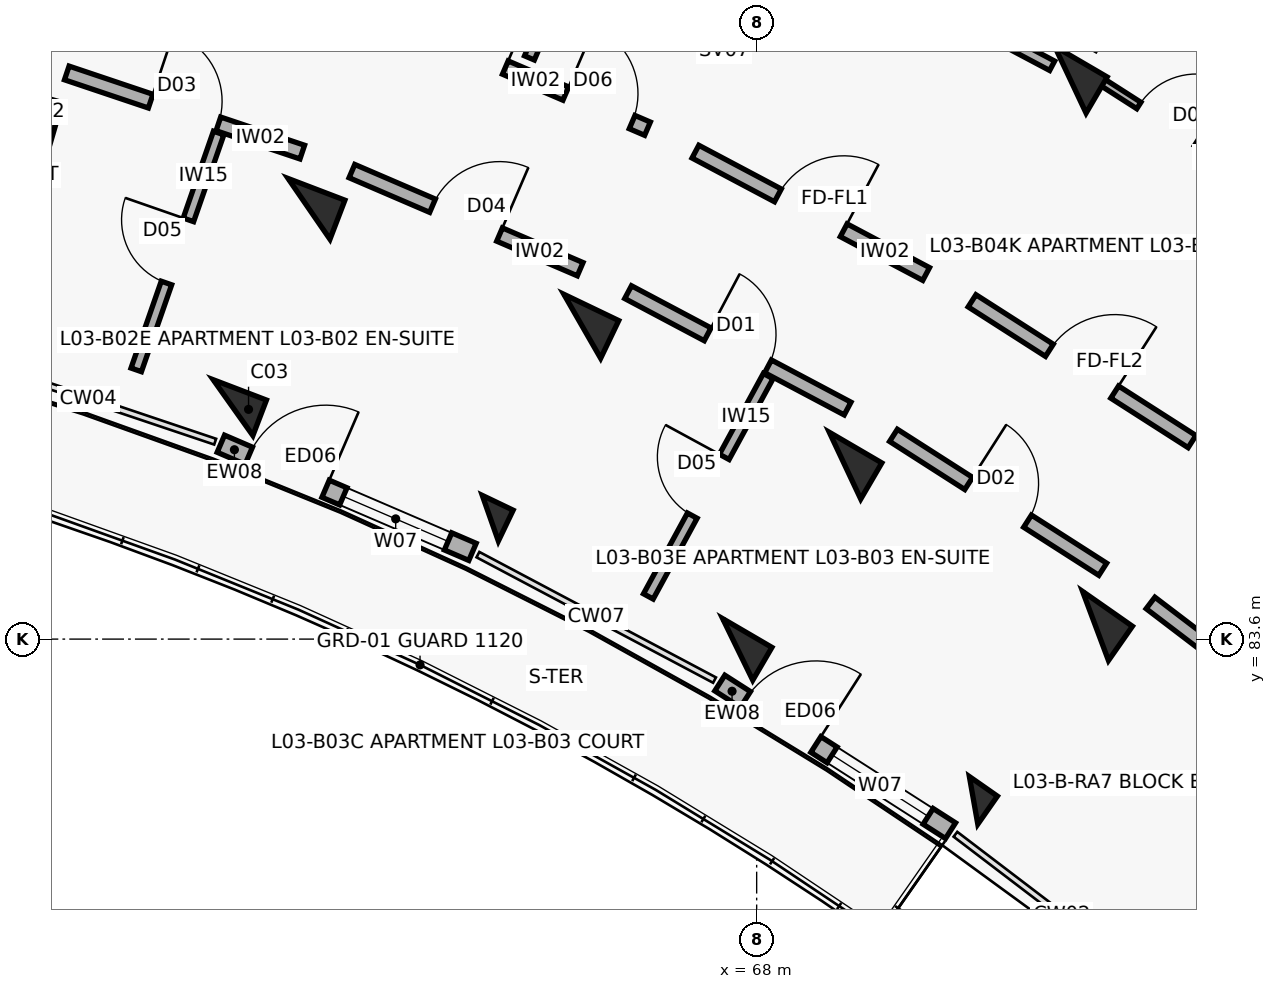
"""IFC4 building model, lengths in metres.
Left out: names, types, materials, properties, quantities, classifications, styles, units other than length and angle.
Written with IfcOpenShell. Run it as: python <this file> out.ifc"""

import sys

from ifc_helpers import new_model, si_unit, direction, frame, frame_2d, origin, origin_2d, place, context, subcontext, project, spatial, rectangle, extrude, element, fill, save


model = new_model("IFC4")
c1 = context("Model", 3, precision=1e-05, world=origin(), true_north=direction((0.0, 1.0)))
c2 = subcontext(c1, "Body", "Model", "MODEL_VIEW")
j1 = project(units=[si_unit("LENGTHUNIT", "METRE"), si_unit("PLANEANGLEUNIT", "RADIAN")], contexts=[c1])
p1 = place(None, origin())
s1 = spatial("IfcSite", under=j1, at=p1, CompositionType="ELEMENT")
p2 = place(p1, origin())
s2 = spatial("IfcBuilding", under=s1, at=p2, CompositionType="ELEMENT")
p3 = place(p2, frame((0.0, 0.0, 11.2)))
s3 = spatial("IfcBuildingStorey", under=s2, at=p3, CompositionType="ELEMENT", Elevation=11.2)
p4 = place(p3, frame((58.401, 90.508, 0.0), z_axis=(0.0, 0.0, 1.0), x_axis=(0.27966144946, 0.96009867914, 0.0)))
e1 = element("IfcColumn", 1, at=p4, inside=s3, PredefinedType="COLUMN", context=c2, shape_type="SweptSolid", body=[
    extrude(rectangle(XDim=0.55, YDim=0.8, at=origin_2d()), origin(), (0.0, 0.0, 1.0), 3.1),
])
p5 = place(p3, frame((61.111, 86.646, 0.0), z_axis=(0.0, 0.0, 1.0), x_axis=(0.357064076459, 0.934079892355, 0.0)))
e2 = element("IfcColumn", 2, at=p5, inside=s3, PredefinedType="COLUMN", context=c2, shape_type="SweptSolid", body=[
    extrude(rectangle(XDim=0.5, YDim=0.75, at=origin_2d()), origin(), (0.0, 0.0, 1.0), 3.1),
])
p6 = place(p3, frame((62.111, 89.261, 0.0), z_axis=(0.0, 0.0, 1.0), x_axis=(0.357064076459, 0.934079892355, 0.0)))
e3 = element("IfcColumn", 3, at=p6, inside=s3, PredefinedType="COLUMN", context=c2, shape_type="SweptSolid", body=[
    extrude(rectangle(XDim=0.55, YDim=0.8, at=origin_2d()), origin(), (0.0, 0.0, 1.0), 3.1),
])
p7 = place(p3, frame((64.496, 85.191, 0.0), z_axis=(0.0, 0.0, 1.0), x_axis=(0.432085748802, 0.901832526405, 0.0)))
e4 = element("IfcColumn", 4, at=p7, inside=s3, PredefinedType="COLUMN", context=c2, shape_type="SweptSolid", body=[
    extrude(rectangle(XDim=0.45, YDim=0.45, at=origin_2d()), origin(), (0.0, 0.0, 1.0), 3.1),
])
p8 = place(p3, frame((65.706, 87.716, 0.0), z_axis=(0.0, 0.0, 1.0), x_axis=(0.432085748802, 0.901832526405, 0.0)))
e5 = element("IfcColumn", 5, at=p8, inside=s3, PredefinedType="COLUMN", context=c2, shape_type="SweptSolid", body=[
    extrude(rectangle(XDim=0.55, YDim=0.8, at=origin_2d()), origin(), (0.0, 0.0, 1.0), 3.1),
])
p9 = place(p3, frame((67.751, 83.464, 0.0), z_axis=(0.0, 0.0, 1.0), x_axis=(0.504226211181, 0.863571611366, 0.0)))
e6 = element("IfcColumn", 6, at=p9, inside=s3, PredefinedType="COLUMN", context=c2, shape_type="SweptSolid", body=[
    extrude(rectangle(XDim=0.5, YDim=0.75, at=origin_2d()), origin(), (0.0, 0.0, 1.0), 3.1),
])
for number, where, z_axis, x_axis in (
    (7, (69.163, 85.882, 0.0), (0.0, 0.0, 1.0), (0.504, 0.864, 0.0)),
    (8, (72.127, 90.96, 0.0), (0.0, 0.0, 1.0), (0.504, 0.864, 0.0)),
):
    element("IfcColumn", number, at=place(p3, frame(where, z_axis=z_axis, x_axis=x_axis)), inside=s3, PredefinedType="COLUMN", context=c2, shape_type="SweptSolid", body=[
        extrude(rectangle(XDim=0.55, YDim=0.8, at=origin_2d()), origin(), (0.0, 0.0, 1.0), 3.1),
    ])
p10 = place(p3, frame((70.854, 81.478, 0.0), z_axis=(0.0, 0.0, 1.0), x_axis=(0.573004420611, 0.819552276527, 0.0)))
e9 = element("IfcColumn", 9, at=p10, inside=s3, PredefinedType="COLUMN", context=c2, shape_type="SweptSolid", body=[
    extrude(rectangle(XDim=0.45, YDim=0.45, at=origin_2d()), origin(), (0.0, 0.0, 1.0), 3.1),
])
p11 = place(p3, frame((72.458, 83.773, 0.0), z_axis=(0.0, 0.0, 1.0), x_axis=(0.573004420611, 0.819552276527, 0.0)))
e10 = element("IfcColumn", 10, at=p11, inside=s3, PredefinedType="COLUMN", context=c2, shape_type="SweptSolid", body=[
    extrude(rectangle(XDim=0.55, YDim=0.8, at=origin_2d()), origin(), (0.0, 0.0, 1.0), 3.1),
])
p12 = place(p3, frame((60.951, 86.171, 0.0), z_axis=(0.0, 0.0, 1.0), x_axis=(0.918713438577, -0.394924825477, 0.0)))
e11 = element("IfcWall", 11, at=p12, inside=s3, PredefinedType="SOLIDWALL", context=c2, shape_type="SweptSolid", body=[
    extrude(rectangle(XDim=3.604, YDim=0.245, at=frame_2d((1.802, 0.0))), origin(), (0.0, 0.0, 1.0), 2.25),
])
p13 = place(p12, frame((0.4, 0.0, 0.0)))
e12 = element("IfcOpeningElement", 12, at=p13, cuts=e11, PredefinedType="OPENING", context=c2, shape_type="SweptSolid", body=[
    extrude(rectangle(XDim=1.1, YDim=2.15, at=frame_2d((0.55, 1.075))), frame((0.0, 0.133, 0.0), z_axis=(0.0, -1.0, 0.0), x_axis=(1.0, 0.0, 0.0)), (0.0, 0.0, 1.0), 0.265),
])
p14 = place(p12, frame((1.754, 0.0, 0.35)))
e13 = element("IfcOpeningElement", 13, at=p14, cuts=e11, PredefinedType="OPENING", context=c2, shape_type="SweptSolid", body=[
    extrude(rectangle(XDim=1.5, YDim=1.65, at=frame_2d((0.75, 0.825))), frame((0.0, 0.133, 0.0), z_axis=(0.0, -1.0, 0.0), x_axis=(1.0, 0.0, 0.0)), (0.0, 0.0, 1.0), 0.265),
])
p15 = place(p3, frame((67.515, 83.022, 0.0), z_axis=(0.0, 0.0, 1.0), x_axis=(0.84225540507, -0.539078688718, 0.0)))
e14 = element("IfcWall", 14, at=p15, inside=s3, PredefinedType="SOLIDWALL", context=c2, shape_type="SweptSolid", body=[
    extrude(rectangle(XDim=3.604, YDim=0.245, at=frame_2d((1.802, 0.0))), origin(), (0.0, 0.0, 1.0), 2.25),
])
p16 = place(p15, frame((0.4, 0.0, 0.0)))
e15 = element("IfcOpeningElement", 15, at=p16, cuts=e14, PredefinedType="OPENING", context=c2, shape_type="SweptSolid", body=[
    extrude(rectangle(XDim=1.1, YDim=2.15, at=frame_2d((0.55, 1.075))), frame((0.0, 0.133, 0.0), z_axis=(0.0, -1.0, 0.0), x_axis=(1.0, 0.0, 0.0)), (0.0, 0.0, 1.0), 0.265),
])
p17 = place(p15, frame((1.754, 0.0, 0.35)))
e16 = element("IfcOpeningElement", 16, at=p17, cuts=e14, PredefinedType="OPENING", context=c2, shape_type="SweptSolid", body=[
    extrude(rectangle(XDim=1.5, YDim=1.65, at=frame_2d((0.75, 0.825))), frame((0.0, 0.133, 0.0), z_axis=(0.0, -1.0, 0.0), x_axis=(1.0, 0.0, 0.0)), (0.0, 0.0, 1.0), 0.265),
])
p18 = place(p3, frame((58.923, 91.049, 0.0), z_axis=(0.0, 0.0, 1.0), x_axis=(0.94787351033, -0.318646839643, 0.0)))
e17 = element("IfcWall", 17, at=p18, inside=s3, PredefinedType="SOLIDWALL", context=c2, shape_type="SweptSolid", body=[
    extrude(rectangle(XDim=3.269, YDim=0.19, at=frame_2d((1.634, 0.0))), origin(), (0.0, 0.0, 1.0), 2.08),
])
p19 = place(p18, frame((1.164, 0.0, 0.0)))
e18 = element("IfcOpeningElement", 18, at=p19, cuts=e17, PredefinedType="OPENING", context=c2, shape_type="SweptSolid", body=[
    extrude(rectangle(XDim=0.94, YDim=2.1, at=frame_2d((0.47, 1.05))), frame((0.0, 0.105, 0.0), z_axis=(0.0, -1.0, 0.0), x_axis=(1.0, 0.0, 0.0)), (0.0, 0.0, 1.0), 0.21),
])
p20 = place(p3, frame((59.837, 87.143, 0.0), z_axis=(0.0, 0.0, 1.0), x_axis=(0.328629662527, 0.944458863534, 0.0)))
e19 = element("IfcWall", 19, at=p20, inside=s3, PredefinedType="PARTITIONING", context=c2, shape_type="SweptSolid", body=[
    extrude(rectangle(XDim=3.3, YDim=0.145, at=frame_2d((1.65, 0.0))), origin(), (0.0, 0.0, 1.0), 2.08),
])
p21 = place(p20, frame((1.21, 0.0, 0.0)))
e20 = element("IfcOpeningElement", 20, at=p21, cuts=e19, PredefinedType="OPENING", context=c2, shape_type="SweptSolid", body=[
    extrude(rectangle(XDim=0.88, YDim=2.1, at=frame_2d((0.44, 1.05))), frame((0.0, 0.083, 0.0), z_axis=(0.0, -1.0, 0.0), x_axis=(1.0, 0.0, 0.0)), (0.0, 0.0, 1.0), 0.165),
])
p22 = place(p3, frame((63.407, 91.673, 0.0), z_axis=(0.0, 0.0, 1.0), x_axis=(0.918718172399, -0.394913813008, 0.0)))
e21 = element("IfcWall", 21, at=p22, inside=s3, PredefinedType="SOLIDWALL", context=c2, shape_type="SweptSolid", body=[
    extrude(rectangle(XDim=3.436, YDim=0.19, at=frame_2d((1.718, 0.0))), origin(), (0.0, 0.0, 1.0), 2.08),
])
p23 = place(p22, frame((0.28, 0.0, 0.0)))
e22 = element("IfcOpeningElement", 22, at=p23, cuts=e21, PredefinedType="OPENING", context=c2, shape_type="SweptSolid", body=[
    extrude(rectangle(XDim=1.12, YDim=2.15, at=frame_2d((0.56, 1.075))), frame((0.0, 0.105, 0.0), z_axis=(0.0, -1.0, 0.0), x_axis=(1.0, 0.0, 0.0)), (0.0, 0.0, 1.0), 0.21),
])
p24 = place(p22, frame((2.266, 0.0, 0.0)))
e23 = element("IfcOpeningElement", 23, at=p24, cuts=e21, PredefinedType="OPENING", context=c2, shape_type="SweptSolid", body=[
    extrude(rectangle(XDim=0.95, YDim=2.1, at=frame_2d((0.475, 1.05))), frame((0.0, 0.105, 0.0), z_axis=(0.0, -1.0, 0.0), x_axis=(1.0, 0.0, 0.0)), (0.0, 0.0, 1.0), 0.21),
])
p25 = place(p3, frame((62.675, 89.758, 0.0), z_axis=(0.0, 0.0, 1.0), x_axis=(0.918723391052, -0.394901672235, 0.0)))
e24 = element("IfcWall", 24, at=p25, inside=s3, PredefinedType="SOLIDWALL", context=c2, shape_type="SweptSolid", body=[
    extrude(rectangle(XDim=3.269, YDim=0.19, at=frame_2d((1.634, 0.0))), origin(), (0.0, 0.0, 1.0), 2.08),
])
p26 = place(p25, frame((1.154, 0.0, 0.0)))
e25 = element("IfcOpeningElement", 25, at=p26, cuts=e24, PredefinedType="OPENING", context=c2, shape_type="SweptSolid", body=[
    extrude(rectangle(XDim=0.96, YDim=2.1, at=frame_2d((0.48, 1.05))), frame((0.0, 0.105, 0.0), z_axis=(0.0, -1.0, 0.0), x_axis=(1.0, 0.0, 0.0)), (0.0, 0.0, 1.0), 0.21),
])
p27 = place(p3, frame((65.01, 91.247, 0.0), z_axis=(0.0, 0.0, 1.0), x_axis=(0.393511564709, 0.919319666079, 0.0)))
e26 = element("IfcWall", 26, at=p27, inside=s3, PredefinedType="PARTITIONING", context=c2, shape_type="SweptSolid", body=[
    extrude(rectangle(XDim=7.95, YDim=0.14, at=frame_2d((3.975, 0.0))), origin(), (0.0, 0.0, 1.0), 2.08),
])
p28 = place(p27, frame((6.05, 0.0, 0.0)))
e27 = element("IfcOpeningElement", 27, at=p28, cuts=e26, PredefinedType="OPENING", context=c2, shape_type="SweptSolid", body=[
    extrude(rectangle(XDim=0.92, YDim=2.1, at=frame_2d((0.46, 1.05))), frame((0.0, 0.08, 0.0), z_axis=(0.0, -1.0, 0.0), x_axis=(1.0, 0.0, 0.0)), (0.0, 0.0, 1.0), 0.16),
])
p29 = place(p3, frame((67.194, 90.014, 0.0), z_axis=(0.0, 0.0, 1.0), x_axis=(0.883410853063, -0.468599258099, 0.0)))
e28 = element("IfcWall", 28, at=p29, inside=s3, PredefinedType="SOLIDWALL", context=c2, shape_type="SweptSolid", body=[
    extrude(rectangle(XDim=3.436, YDim=0.19, at=frame_2d((1.718, 0.0))), origin(), (0.0, 0.0, 1.0), 2.08),
])
p30 = place(p29, frame((1.228, 0.0, 0.0)))
e29 = element("IfcOpeningElement", 29, at=p30, cuts=e28, PredefinedType="OPENING", context=c2, shape_type="SweptSolid", body=[
    extrude(rectangle(XDim=0.98, YDim=2.15, at=frame_2d((0.49, 1.075))), frame((0.0, 0.105, 0.0), z_axis=(0.0, -1.0, 0.0), x_axis=(1.0, 0.0, 0.0)), (0.0, 0.0, 1.0), 0.21),
])
p31 = place(p3, frame((66.309, 88.165, 0.0), z_axis=(0.0, 0.0, 1.0), x_axis=(0.883444301944, -0.468536194293, 0.0)))
e30 = element("IfcWall", 30, at=p31, inside=s3, PredefinedType="SOLIDWALL", context=c2, shape_type="SweptSolid", body=[
    extrude(rectangle(XDim=3.269, YDim=0.19, at=frame_2d((1.634, 0.0))), origin(), (0.0, 0.0, 1.0), 2.08),
])
p32 = place(p31, frame((1.184, 0.0, 0.0)))
e31 = element("IfcOpeningElement", 31, at=p32, cuts=e30, PredefinedType="OPENING", context=c2, shape_type="SweptSolid", body=[
    extrude(rectangle(XDim=0.9, YDim=2.1, at=frame_2d((0.45, 1.05))), frame((0.0, 0.105, 0.0), z_axis=(0.0, -1.0, 0.0), x_axis=(1.0, 0.0, 0.0)), (0.0, 0.0, 1.0), 0.21),
])
p33 = place(p3, frame((66.575, 84.162, 0.0), z_axis=(0.0, 0.0, 1.0), x_axis=(0.477841058477, 0.878446311868, 0.0)))
e32 = element("IfcWall", 32, at=p33, inside=s3, PredefinedType="PARTITIONING", context=c2, shape_type="SweptSolid", body=[
    extrude(rectangle(XDim=3.3, YDim=0.145, at=frame_2d((1.65, 0.0))), origin(), (0.0, 0.0, 1.0), 2.08),
])
p34 = place(p33, frame((1.21, 0.0, 0.0)))
e33 = element("IfcOpeningElement", 33, at=p34, cuts=e32, PredefinedType="OPENING", context=c2, shape_type="SweptSolid", body=[
    extrude(rectangle(XDim=0.88, YDim=2.1, at=frame_2d((0.44, 1.05))), frame((0.0, 0.083, 0.0), z_axis=(0.0, -1.0, 0.0), x_axis=(1.0, 0.0, 0.0)), (0.0, 0.0, 1.0), 0.165),
])
p35 = place(p3, frame((68.533, 92.923, 0.0), z_axis=(0.0, 0.0, 1.0), x_axis=(0.88341855112, -0.46858474531, 0.0)))
e34 = element("IfcWall", 34, at=p35, inside=s3, PredefinedType="PARTITIONING", context=c2, shape_type="SweptSolid", body=[
    extrude(rectangle(XDim=3.797, YDim=0.14, at=frame_2d((1.898, 0.0))), origin(), (0.0, 0.0, 1.0), 2.08),
])
p36 = place(p35, frame((0.65, 0.0, 0.0)))
e35 = element("IfcOpeningElement", 35, at=p36, cuts=e34, PredefinedType="OPENING", context=c2, shape_type="SweptSolid", body=[
    extrude(rectangle(XDim=0.9, YDim=2.1, at=frame_2d((0.45, 1.05))), frame((0.0, 0.08, 0.0), z_axis=(0.0, -1.0, 0.0), x_axis=(1.0, 0.0, 0.0)), (0.0, 0.0, 1.0), 0.16),
])
p37 = place(p35, frame((2.267, 0.0, 0.0)))
e36 = element("IfcOpeningElement", 36, at=p37, cuts=e34, PredefinedType="OPENING", context=c2, shape_type="SweptSolid", body=[
    extrude(rectangle(XDim=0.88, YDim=2.1, at=frame_2d((0.44, 1.05))), frame((0.0, 0.08, 0.0), z_axis=(0.0, -1.0, 0.0), x_axis=(1.0, 0.0, 0.0)), (0.0, 0.0, 1.0), 0.16),
])
p38 = place(p3, frame((70.834, 88.051, 0.0), z_axis=(0.0, 0.0, 1.0), x_axis=(0.842257205985, -0.539075874963, 0.0)))
e37 = element("IfcWall", 37, at=p38, inside=s3, PredefinedType="SOLIDWALL", context=c2, shape_type="SweptSolid", body=[
    extrude(rectangle(XDim=3.436, YDim=0.19, at=frame_2d((1.718, 0.0))), origin(), (0.0, 0.0, 1.0), 2.08),
])
p39 = place(p38, frame((1.208, 0.0, 0.0)))
e38 = element("IfcOpeningElement", 38, at=p39, cuts=e37, PredefinedType="OPENING", context=c2, shape_type="SweptSolid", body=[
    extrude(rectangle(XDim=1.02, YDim=2.15, at=frame_2d((0.51, 1.075))), frame((0.0, 0.105, 0.0), z_axis=(0.0, -1.0, 0.0), x_axis=(1.0, 0.0, 0.0)), (0.0, 0.0, 1.0), 0.21),
])
p40 = place(p3, frame((69.8, 86.281, 0.0), z_axis=(0.0, 0.0, 1.0), x_axis=(0.842225276846, -0.539125758095, 0.0)))
e39 = element("IfcWall", 39, at=p40, inside=s3, PredefinedType="SOLIDWALL", context=c2, shape_type="SweptSolid", body=[
    extrude(rectangle(XDim=3.269, YDim=0.19, at=frame_2d((1.634, 0.0))), origin(), (0.0, 0.0, 1.0), 2.08),
])
p41 = place(p40, frame((1.174, 0.0, 0.0)))
e40 = element("IfcOpeningElement", 40, at=p41, cuts=e39, PredefinedType="OPENING", context=c2, shape_type="SweptSolid", body=[
    extrude(rectangle(XDim=0.92, YDim=2.1, at=frame_2d((0.46, 1.05))), frame((0.0, 0.105, 0.0), z_axis=(0.0, -1.0, 0.0), x_axis=(1.0, 0.0, 0.0)), (0.0, 0.0, 1.0), 0.21),
])
p42 = place(p3, frame((72.481, 90.971, 0.0), z_axis=(0.0, 0.0, 1.0), x_axis=(0.842238809758, -0.53910461632, 0.0)))
e41 = element("IfcWall", 41, at=p42, inside=s3, PredefinedType="PARTITIONING", context=c2, shape_type="SweptSolid", body=[
    extrude(rectangle(XDim=3.81, YDim=0.1, at=frame_2d((1.905, 0.0))), origin(), (0.0, 0.0, 1.0), 2.08),
])
p43 = place(p42, frame((0.65, 0.0, 0.0)))
e42 = element("IfcOpeningElement", 42, at=p43, cuts=e41, PredefinedType="OPENING", context=c2, shape_type="SweptSolid", body=[
    extrude(rectangle(XDim=0.9, YDim=2.1, at=frame_2d((0.45, 1.05))), frame((0.0, 0.06, 0.0), z_axis=(0.0, -1.0, 0.0), x_axis=(1.0, 0.0, 0.0)), (0.0, 0.0, 1.0), 0.12),
])
p44 = place(p42, frame((2.28, 0.0, 0.0)))
e43 = element("IfcOpeningElement", 43, at=p44, cuts=e41, PredefinedType="OPENING", context=c2, shape_type="SweptSolid", body=[
    extrude(rectangle(XDim=0.88, YDim=2.1, at=frame_2d((0.44, 1.05))), frame((0.0, 0.06, 0.0), z_axis=(0.0, -1.0, 0.0), x_axis=(1.0, 0.0, 0.0)), (0.0, 0.0, 1.0), 0.12),
])
p45 = place(p3, frame((73.182, 84.076, 0.0), z_axis=(0.0, 0.0, 1.0), x_axis=(0.795501577908, -0.605951515838, 0.0)))
e44 = element("IfcWall", 44, at=p45, inside=s3, PredefinedType="SOLIDWALL", context=c2, shape_type="SweptSolid", body=[
    extrude(rectangle(XDim=3.129, YDim=0.19, at=frame_2d((1.564, 0.0))), origin(), (0.0, 0.0, 1.0), 2.08),
])
p46 = place(p45, frame((1.004, 0.0, 0.0)))
e45 = element("IfcOpeningElement", 45, at=p46, cuts=e44, PredefinedType="OPENING", context=c2, shape_type="SweptSolid", body=[
    extrude(rectangle(XDim=1.12, YDim=2.15, at=frame_2d((0.56, 1.075))), frame((0.0, 0.105, 0.0), z_axis=(0.0, -1.0, 0.0), x_axis=(1.0, 0.0, 0.0)), (0.0, 0.0, 1.0), 0.21),
])
p47 = place(p13, origin())
e46 = element("IfcDoor", 46, at=p47, inside=s3, OperationType="SINGLE_SWING_RIGHT", PredefinedType="DOOR", context=c2, shape_type="SweptSolid", body=[
    extrude(rectangle(XDim=1.1, YDim=2.15, at=frame_2d((0.55, 1.075))), frame((0.0, 0.025, 0.0), z_axis=(0.0, -1.0, 0.0), x_axis=(1.0, 0.0, 0.0)), (0.0, 0.0, 1.0), 0.05),
])
fill(e12, e46)
p48 = place(p14, origin())
e47 = element("IfcWindow", 47, at=p48, inside=s3, PartitioningType="DOUBLE_PANEL_VERTICAL", PredefinedType="WINDOW", context=c2, shape_type="SweptSolid", body=[
    extrude(rectangle(XDim=1.5, YDim=1.65, at=frame_2d((0.75, 0.825))), frame((0.0, 0.03, 0.0), z_axis=(0.0, -1.0, 0.0), x_axis=(1.0, 0.0, 0.0)), (0.0, 0.0, 1.0), 0.06),
])
fill(e13, e47)
p49 = place(p16, origin())
e48 = element("IfcDoor", 48, at=p49, inside=s3, OperationType="SINGLE_SWING_RIGHT", PredefinedType="DOOR", context=c2, shape_type="SweptSolid", body=[
    extrude(rectangle(XDim=1.1, YDim=2.15, at=frame_2d((0.55, 1.075))), frame((0.0, 0.025, 0.0), z_axis=(0.0, -1.0, 0.0), x_axis=(1.0, 0.0, 0.0)), (0.0, 0.0, 1.0), 0.05),
])
fill(e15, e48)
p50 = place(p17, origin())
e49 = element("IfcWindow", 49, at=p50, inside=s3, PartitioningType="DOUBLE_PANEL_VERTICAL", PredefinedType="WINDOW", context=c2, shape_type="SweptSolid", body=[
    extrude(rectangle(XDim=1.5, YDim=1.65, at=frame_2d((0.75, 0.825))), frame((0.0, 0.03, 0.0), z_axis=(0.0, -1.0, 0.0), x_axis=(1.0, 0.0, 0.0)), (0.0, 0.0, 1.0), 0.06),
])
fill(e16, e49)
p51 = place(p19, origin())
e50 = element("IfcDoor", 50, at=p51, inside=s3, OperationType="SINGLE_SWING_LEFT", PredefinedType="DOOR", context=c2, shape_type="SweptSolid", body=[
    extrude(rectangle(XDim=0.94, YDim=2.1, at=frame_2d((0.47, 1.05))), frame((0.0, 0.025, 0.0), z_axis=(0.0, -1.0, 0.0), x_axis=(1.0, 0.0, 0.0)), (0.0, 0.0, 1.0), 0.05),
])
fill(e18, e50)
p52 = place(p21, origin())
e51 = element("IfcDoor", 51, at=p52, inside=s3, OperationType="SINGLE_SWING_RIGHT", PredefinedType="DOOR", context=c2, shape_type="SweptSolid", body=[
    extrude(rectangle(XDim=0.88, YDim=2.1, at=frame_2d((0.44, 1.05))), frame((0.0, 0.025, 0.0), z_axis=(0.0, -1.0, 0.0), x_axis=(1.0, 0.0, 0.0)), (0.0, 0.0, 1.0), 0.05),
])
fill(e20, e51)
p53 = place(p23, origin())
e52 = element("IfcDoor", 52, at=p53, inside=s3, OperationType="SINGLE_SWING_RIGHT", PredefinedType="DOOR", context=c2, shape_type="SweptSolid", body=[
    extrude(rectangle(XDim=1.12, YDim=2.15, at=frame_2d((0.56, 1.075))), frame((0.0, 0.025, 0.0), z_axis=(0.0, -1.0, 0.0), x_axis=(1.0, 0.0, 0.0)), (0.0, 0.0, 1.0), 0.05),
])
fill(e22, e52)
p54 = place(p24, origin())
e53 = element("IfcDoor", 53, at=p54, inside=s3, OperationType="SINGLE_SWING_LEFT", PredefinedType="DOOR", context=c2, shape_type="SweptSolid", body=[
    extrude(rectangle(XDim=0.95, YDim=2.1, at=frame_2d((0.475, 1.05))), frame((0.0, 0.025, 0.0), z_axis=(0.0, -1.0, 0.0), x_axis=(1.0, 0.0, 0.0)), (0.0, 0.0, 1.0), 0.05),
])
fill(e23, e53)
p55 = place(p26, origin())
e54 = element("IfcDoor", 54, at=p55, inside=s3, OperationType="SINGLE_SWING_RIGHT", PredefinedType="DOOR", context=c2, shape_type="SweptSolid", body=[
    extrude(rectangle(XDim=0.96, YDim=2.1, at=frame_2d((0.48, 1.05))), frame((0.0, 0.025, 0.0), z_axis=(0.0, -1.0, 0.0), x_axis=(1.0, 0.0, 0.0)), (0.0, 0.0, 1.0), 0.05),
])
fill(e25, e54)
p56 = place(p30, origin())
e55 = element("IfcDoor", 55, at=p56, inside=s3, OperationType="SINGLE_SWING_RIGHT", PredefinedType="DOOR", context=c2, shape_type="SweptSolid", body=[
    extrude(rectangle(XDim=0.98, YDim=2.15, at=frame_2d((0.49, 1.075))), frame((0.0, 0.025, 0.0), z_axis=(0.0, -1.0, 0.0), x_axis=(1.0, 0.0, 0.0)), (0.0, 0.0, 1.0), 0.05),
])
fill(e29, e55)
p57 = place(p32, origin())
e56 = element("IfcDoor", 56, at=p57, inside=s3, OperationType="SINGLE_SWING_LEFT", PredefinedType="DOOR", context=c2, shape_type="SweptSolid", body=[
    extrude(rectangle(XDim=0.9, YDim=2.1, at=frame_2d((0.45, 1.05))), frame((0.0, 0.025, 0.0), z_axis=(0.0, -1.0, 0.0), x_axis=(1.0, 0.0, 0.0)), (0.0, 0.0, 1.0), 0.05),
])
fill(e31, e56)
p58 = place(p34, origin())
e57 = element("IfcDoor", 57, at=p58, inside=s3, OperationType="SINGLE_SWING_RIGHT", PredefinedType="DOOR", context=c2, shape_type="SweptSolid", body=[
    extrude(rectangle(XDim=0.88, YDim=2.1, at=frame_2d((0.44, 1.05))), frame((0.0, 0.025, 0.0), z_axis=(0.0, -1.0, 0.0), x_axis=(1.0, 0.0, 0.0)), (0.0, 0.0, 1.0), 0.05),
])
fill(e33, e57)
p59 = place(p39, origin())
e58 = element("IfcDoor", 58, at=p59, inside=s3, OperationType="SINGLE_SWING_RIGHT", PredefinedType="DOOR", context=c2, shape_type="SweptSolid", body=[
    extrude(rectangle(XDim=1.02, YDim=2.15, at=frame_2d((0.51, 1.075))), frame((0.0, 0.025, 0.0), z_axis=(0.0, -1.0, 0.0), x_axis=(1.0, 0.0, 0.0)), (0.0, 0.0, 1.0), 0.05),
])
fill(e38, e58)
p60 = place(p41, origin())
e59 = element("IfcDoor", 59, at=p60, inside=s3, OperationType="SINGLE_SWING_LEFT", PredefinedType="DOOR", context=c2, shape_type="SweptSolid", body=[
    extrude(rectangle(XDim=0.92, YDim=2.1, at=frame_2d((0.46, 1.05))), frame((0.0, 0.025, 0.0), z_axis=(0.0, -1.0, 0.0), x_axis=(1.0, 0.0, 0.0)), (0.0, 0.0, 1.0), 0.05),
])
fill(e40, e59)
p61 = place(p43, origin())
e60 = element("IfcDoor", 60, at=p61, inside=s3, OperationType="SINGLE_SWING_RIGHT", PredefinedType="DOOR", context=c2, shape_type="SweptSolid", body=[
    extrude(rectangle(XDim=0.9, YDim=2.1, at=frame_2d((0.45, 1.05))), frame((0.0, 0.025, 0.0), z_axis=(0.0, -1.0, 0.0), x_axis=(1.0, 0.0, 0.0)), (0.0, 0.0, 1.0), 0.05),
])
fill(e42, e60)
save(model, sys.argv[1])
